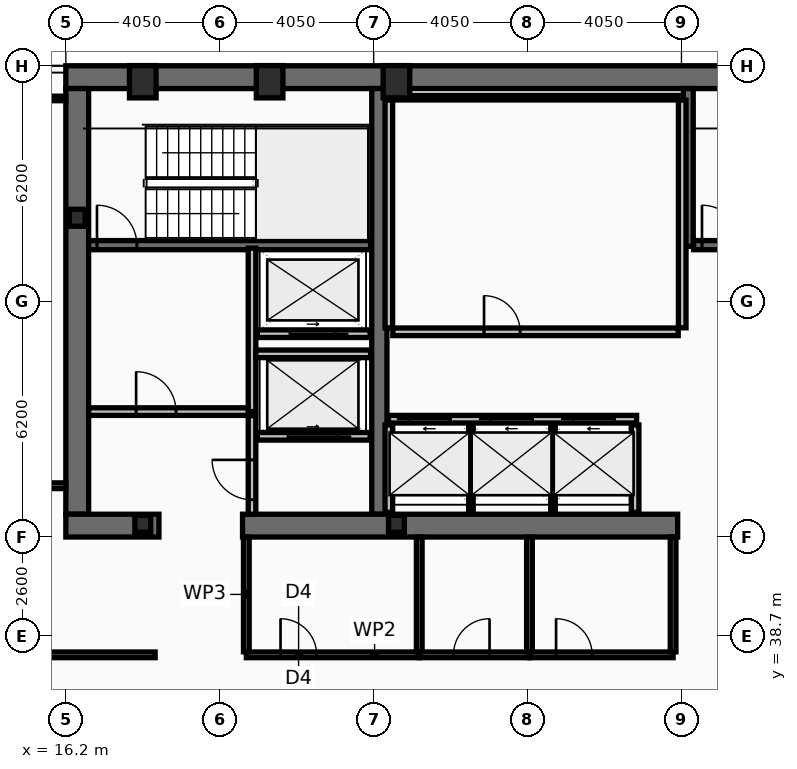
"""IFC4 building model, lengths in metres.
Left out: names, types, materials, properties, quantities, classifications, styles, units other than length and angle.
Written with IfcOpenShell. Run it as: python <this file> out.ifc"""

import sys

from ifc_helpers import new_model, si_unit, direction, frame, frame_2d, origin, origin_2d, place, context, subcontext, project, spatial, rectangle, hollow_rectangle, i_section, extrude, element, fill, save


model = new_model("IFC4")
c1 = context("Model", 3, precision=1e-05, world=origin(), true_north=direction((0.0, 1.0)))
c2 = subcontext(c1, "Body", "Model", "MODEL_VIEW")
j1 = project(units=[si_unit("LENGTHUNIT", "METRE"), si_unit("PLANEANGLEUNIT", "RADIAN")], contexts=[c1])
p1 = place(None, origin())
s1 = spatial("IfcSite", under=j1, at=p1, CompositionType="ELEMENT")
p2 = place(p1, origin())
s2 = spatial("IfcBuilding", under=s1, at=p2, CompositionType="ELEMENT")
p3 = place(p2, frame((0.0, 0.0, 177.0)))
s3 = spatial("IfcBuildingStorey", under=s2, at=p3, CompositionType="ELEMENT", Elevation=177.0)
p4 = place(p3, frame((16.2, 53.4, 0.0), z_axis=(0.0, 0.0, 1.0), x_axis=(1.0, 0.0, 0.0)))
e1 = element("IfcWall", 1, at=p4, inside=s3, PredefinedType="SHEAR", context=c2, shape_type="SweptSolid", body=[
    extrude(rectangle(XDim=40.5, YDim=0.6, at=frame_2d((20.25, 0.0))), origin(), (0.0, 0.0, 1.0), 3.44),
])
p5 = place(p3, frame((16.5, 41.9, 0.0), z_axis=(0.0, 0.0, 1.0), x_axis=(0.0, 1.0, 0.0)))
e2 = element("IfcWall", 2, at=p5, inside=s3, PredefinedType="SHEAR", context=c2, shape_type="SweptSolid", body=[
    extrude(rectangle(XDim=11.2, YDim=0.6, at=frame_2d((5.6, 0.0))), origin(), (0.0, 0.0, 1.0), 3.44),
])
p6 = place(p3, frame((24.45, 41.9, 0.0), z_axis=(0.0, 0.0, 1.0), x_axis=(0.0, 1.0, 0.0)))
e3 = element("IfcWall", 3, at=p6, inside=s3, PredefinedType="SHEAR", context=c2, shape_type="SweptSolid", body=[
    extrude(rectangle(XDim=11.2, YDim=0.4, at=frame_2d((5.6, 0.0))), origin(), (0.0, 0.0, 1.0), 3.44),
])
p7 = place(p3, frame((18.65, 41.6, 0.0), z_axis=(0.0, 0.0, 1.0), x_axis=(-1.0, 0.0, 0.0)))
e4 = element("IfcWall", 4, at=p7, inside=s3, PredefinedType="SHEAR", context=c2, shape_type="SweptSolid", body=[
    extrude(rectangle(XDim=2.45, YDim=0.6, at=frame_2d((1.225, 0.0))), origin(), (0.0, 0.0, 1.0), 3.44),
])
p8 = place(p3, frame((32.3, 41.6, 0.0), z_axis=(0.0, 0.0, 1.0), x_axis=(-1.0, 0.0, 0.0)))
e5 = element("IfcWall", 5, at=p8, inside=s3, PredefinedType="SHEAR", context=c2, shape_type="SweptSolid", body=[
    extrude(rectangle(XDim=11.45, YDim=0.6, at=frame_2d((5.725, 0.0))), origin(), (0.0, 0.0, 1.0), 3.44),
])
p9 = place(p3, frame((32.58, 48.95, 0.0), z_axis=(0.0, 0.0, 1.0), x_axis=(0.0, 1.0, 0.0)))
e6 = element("IfcWall", 6, at=p9, inside=s3, PredefinedType="SHEAR", context=c2, shape_type="SweptSolid", body=[
    extrude(rectangle(XDim=4.15, YDim=0.26, at=frame_2d((2.075, 0.0))), origin(), (0.0, 0.0, 1.0), 3.44),
])
p10 = place(p3, frame((16.8, 48.98, 0.0), z_axis=(0.0, 0.0, 1.0), x_axis=(1.0, 0.0, 0.0)))
e7 = element("IfcWall", 7, at=p10, inside=s3, PredefinedType="SHEAR", context=c2, shape_type="SweptSolid", body=[
    extrude(rectangle(XDim=7.42, YDim=0.24, at=frame_2d((3.71, 0.0))), origin(), (0.0, 0.0, 1.0), 3.44),
])
p11 = place(p10, frame((0.22, 0.0, 0.0)))
e8 = element("IfcOpeningElement", 8, at=p11, cuts=e7, PredefinedType="OPENING", context=c2, shape_type="SweptSolid", body=[
    extrude(rectangle(XDim=1.05, YDim=2.15, at=frame_2d((0.525, 1.075))), frame((0.0, 0.13, 0.0), z_axis=(0.0, -1.0, 0.0), x_axis=(1.0, 0.0, 0.0)), (0.0, 0.0, 1.0), 0.26),
])
p12 = place(p3, frame((32.72, 48.98, 0.0), z_axis=(0.0, 0.0, 1.0), x_axis=(1.0, 0.0, 0.0)))
e9 = element("IfcWall", 9, at=p12, inside=s3, PredefinedType="SHEAR", context=c2, shape_type="SweptSolid", body=[
    extrude(rectangle(XDim=7.56, YDim=0.24, at=frame_2d((3.78, 0.0))), origin(), (0.0, 0.0, 1.0), 3.44),
])
p13 = place(p12, frame((0.22, 0.0, 0.0)))
e10 = element("IfcOpeningElement", 10, at=p13, cuts=e9, PredefinedType="OPENING", context=c2, shape_type="SweptSolid", body=[
    extrude(rectangle(XDim=1.05, YDim=2.15, at=frame_2d((0.525, 1.075))), frame((0.0, 0.13, 0.0), z_axis=(0.0, -1.0, 0.0), x_axis=(1.0, 0.0, 0.0)), (0.0, 0.0, 1.0), 0.26),
])
for number, where, z_axis, x_axis in (
    (11, (18.225, 53.28, 0.0), (0.0, 0.0, 1.0), (1.0, 0.0, 0.0)),
    (12, (21.562, 53.28, 0.0), (0.0, 0.0, 1.0), (1.0, 0.0, 0.0)),
    (13, (24.9, 53.28, 0.0), (0.0, 0.0, 1.0), (1.0, 0.0, 0.0)),
):
    element("IfcColumn", number, at=place(p3, frame(where, z_axis=z_axis, x_axis=x_axis)), inside=s3, PredefinedType="COLUMN", context=c2, shape_type="SweptSolid", body=[
        extrude(hollow_rectangle(XDim=0.7, YDim=0.85, WallThickness=0.05, at=origin_2d()), origin(), (0.0, 0.0, 1.0), 3.6),
    ])
for number, where, z_axis, x_axis in (
    (14, (16.5, 49.7, 0.0), (0.0, 0.0, 1.0), (1.0, 0.0, 0.0)),
    (15, (18.225, 41.65, 0.0), (0.0, 0.0, 1.0), (1.0, 0.0, 0.0)),
    (16, (24.9, 41.65, 0.0), (0.0, 0.0, 1.0), (1.0, 0.0, 0.0)),
):
    element("IfcColumn", number, at=place(p3, frame(where, z_axis=z_axis, x_axis=x_axis)), inside=s3, PredefinedType="COLUMN", context=c2, shape_type="SweptSolid", body=[
        extrude(i_section(OverallWidth=0.416, OverallDepth=0.446, WebThickness=0.039, FlangeThickness=0.063, at=origin_2d()), origin(), (0.0, 0.0, 1.0), 3.6),
    ])
p14 = place(p3, frame((24.69, 44.4, 0.0), z_axis=(0.0, 0.0, 1.0), x_axis=(1.0, 0.0, 0.0)))
e17 = element("IfcWall", 17, at=p14, inside=s3, PredefinedType="PARTITIONING", context=c2, shape_type="SweptSolid", body=[
    extrude(rectangle(XDim=6.53, YDim=0.2, at=frame_2d((3.265, 0.0))), origin(), (0.0, 0.0, 1.0), 3.44),
])
p15 = place(p14, frame((0.53, 0.0, 0.0)))
e18 = element("IfcOpeningElement", 18, at=p15, cuts=e17, PredefinedType="OPENING", context=c2, shape_type="SweptSolid", body=[
    extrude(rectangle(XDim=1.1, YDim=2.18, at=frame_2d((0.55, 1.09))), frame((0.0, 0.11, 0.0), z_axis=(0.0, -1.0, 0.0), x_axis=(1.0, 0.0, 0.0)), (0.0, 0.0, 1.0), 0.22),
])
p16 = place(p14, frame((2.69, 0.0, 0.0)))
e19 = element("IfcOpeningElement", 19, at=p16, cuts=e17, PredefinedType="OPENING", context=c2, shape_type="SweptSolid", body=[
    extrude(rectangle(XDim=1.1, YDim=2.18, at=frame_2d((0.55, 1.09))), frame((0.0, 0.11, 0.0), z_axis=(0.0, -1.0, 0.0), x_axis=(1.0, 0.0, 0.0)), (0.0, 0.0, 1.0), 0.22),
])
p17 = place(p14, frame((4.85, 0.0, 0.0)))
e20 = element("IfcOpeningElement", 20, at=p17, cuts=e17, PredefinedType="OPENING", context=c2, shape_type="SweptSolid", body=[
    extrude(rectangle(XDim=1.1, YDim=2.18, at=frame_2d((0.55, 1.09))), frame((0.0, 0.11, 0.0), z_axis=(0.0, -1.0, 0.0), x_axis=(1.0, 0.0, 0.0)), (0.0, 0.0, 1.0), 0.22),
])
p18 = place(p3, frame((24.21, 43.95, 0.0), z_axis=(0.0, 0.0, 1.0), x_axis=(-1.0, 0.0, 0.0)))
e21 = element("IfcWall", 21, at=p18, inside=s3, PredefinedType="PARTITIONING", context=c2, shape_type="SweptSolid", body=[
    extrude(rectangle(XDim=2.97, YDim=0.2, at=frame_2d((1.485, 0.0))), origin(), (0.0, 0.0, 1.0), 3.44),
])
p19 = place(p18, frame((0.86, 0.0, 0.0)))
e22 = element("IfcOpeningElement", 22, at=p19, cuts=e21, PredefinedType="OPENING", context=c2, shape_type="SweptSolid", body=[
    extrude(rectangle(XDim=1.3, YDim=2.18, at=frame_2d((0.65, 1.09))), frame((0.0, 0.11, 0.0), z_axis=(0.0, -1.0, 0.0), x_axis=(1.0, 0.0, 0.0)), (0.0, 0.0, 1.0), 0.22),
])
p20 = place(p3, frame((24.21, 46.65, 0.0), z_axis=(0.0, 0.0, 1.0), x_axis=(-1.0, 0.0, 0.0)))
e23 = element("IfcWall", 23, at=p20, inside=s3, PredefinedType="PARTITIONING", context=c2, shape_type="SweptSolid", body=[
    extrude(rectangle(XDim=2.97, YDim=0.2, at=frame_2d((1.485, 0.0))), origin(), (0.0, 0.0, 1.0), 3.44),
])
p21 = place(p20, frame((0.91, 0.0, 0.0)))
e24 = element("IfcOpeningElement", 24, at=p21, cuts=e23, PredefinedType="OPENING", context=c2, shape_type="SweptSolid", body=[
    extrude(rectangle(XDim=1.2, YDim=2.18, at=frame_2d((0.6, 1.09))), frame((0.0, 0.11, 0.0), z_axis=(0.0, -1.0, 0.0), x_axis=(1.0, 0.0, 0.0)), (0.0, 0.0, 1.0), 0.22),
])
p22 = place(p3, frame((21.1, 44.6, 0.0), z_axis=(0.0, 0.0, 1.0), x_axis=(0.0, 1.0, 0.0)))
e25 = element("IfcWall", 25, at=p22, inside=s3, PredefinedType="PARTITIONING", context=c2, shape_type="SweptSolid", body=[
    extrude(rectangle(XDim=4.3, YDim=0.2, at=frame_2d((2.15, 0.0))), origin(), (0.0, 0.0, 1.0), 3.44),
])
p23 = place(p3, frame((16.8, 44.6, 0.0), z_axis=(0.0, 0.0, 1.0), x_axis=(1.0, 0.0, 0.0)))
e26 = element("IfcWall", 26, at=p23, inside=s3, PredefinedType="PARTITIONING", context=c2, shape_type="SweptSolid", body=[
    extrude(rectangle(XDim=4.2, YDim=0.2, at=frame_2d((2.1, 0.0))), origin(), (0.0, 0.0, 1.0), 3.44),
])
p24 = place(p23, frame((1.25, 0.0, 0.0)))
e27 = element("IfcOpeningElement", 27, at=p24, cuts=e26, PredefinedType="OPENING", context=c2, shape_type="SweptSolid", body=[
    extrude(rectangle(XDim=1.05, YDim=2.15, at=frame_2d((0.525, 1.075))), frame((0.0, 0.11, 0.0), z_axis=(0.0, -1.0, 0.0), x_axis=(1.0, 0.0, 0.0)), (0.0, 0.0, 1.0), 0.22),
])
p25 = place(p3, frame((21.2, 46.12, 0.0), z_axis=(0.0, 0.0, 1.0), x_axis=(1.0, 0.0, 0.0)))
e28 = element("IfcWall", 28, at=p25, inside=s3, PredefinedType="PARTITIONING", context=c2, shape_type="SweptSolid", body=[
    extrude(rectangle(XDim=3.02, YDim=0.2, at=frame_2d((1.51, 0.0))), origin(), (0.0, 0.0, 1.0), 3.44),
])
p26 = place(p3, frame((21.1, 41.9, 0.0), z_axis=(0.0, 0.0, 1.0), x_axis=(0.0, 1.0, 0.0)))
e29 = element("IfcWall", 29, at=p26, inside=s3, PredefinedType="PARTITIONING", context=c2, shape_type="SweptSolid", body=[
    extrude(rectangle(XDim=2.595, YDim=0.2, at=frame_2d((1.298, 0.0))), origin(), (0.0, 0.0, 1.0), 3.44),
])
p27 = place(p26, frame((0.38, 0.0, 0.0)))
e30 = element("IfcOpeningElement", 30, at=p27, cuts=e29, PredefinedType="OPENING", context=c2, shape_type="SweptSolid", body=[
    extrude(rectangle(XDim=1.05, YDim=2.15, at=frame_2d((0.525, 1.075))), frame((0.0, 0.11, 0.0), z_axis=(0.0, -1.0, 0.0), x_axis=(1.0, 0.0, 0.0)), (0.0, 0.0, 1.0), 0.22),
])
for number, where, z_axis, x_axis in (
    (31, (24.7, 46.805, 0.0), (0.0, 0.0, 1.0), (0.0, 1.0, 0.0)),
    (32, (32.42, 46.805, 0.0), (0.0, 0.0, 1.0), (0.0, 1.0, 0.0)),
):
    element("IfcWall", number, at=place(p3, frame(where, z_axis=z_axis, x_axis=x_axis)), inside=s3, PredefinedType="PARTITIONING", context=c2, shape_type="SweptSolid", body=[
        extrude(rectangle(XDim=5.99, YDim=0.2, at=frame_2d((2.995, 0.0))), origin(), (0.0, 0.0, 1.0), 3.44),
    ])
p28 = place(p3, frame((24.805, 52.86, 0.0), z_axis=(0.0, 0.0, 1.0), x_axis=(1.0, 0.0, 0.0)))
e33 = element("IfcWall", 33, at=p28, inside=s3, PredefinedType="PARTITIONING", context=c2, shape_type="SweptSolid", body=[
    extrude(rectangle(XDim=7.51, YDim=0.12, at=frame_2d((3.755, 0.0))), origin(), (0.0, 0.0, 1.0), 3.44),
])
p29 = place(p3, frame((24.805, 46.7, 0.0), z_axis=(0.0, 0.0, 1.0), x_axis=(1.0, 0.0, 0.0)))
e34 = element("IfcWall", 34, at=p29, inside=s3, PredefinedType="PARTITIONING", context=c2, shape_type="SweptSolid", body=[
    extrude(rectangle(XDim=7.51, YDim=0.2, at=frame_2d((3.755, 0.0))), origin(), (0.0, 0.0, 1.0), 3.44),
])
p30 = place(p29, frame((2.4, 0.0, 0.0)))
e35 = element("IfcOpeningElement", 35, at=p30, cuts=e34, PredefinedType="OPENING", context=c2, shape_type="SweptSolid", body=[
    extrude(rectangle(XDim=0.95, YDim=2.1, at=frame_2d((0.475, 1.05))), frame((0.0, 0.11, 0.0), z_axis=(0.0, -1.0, 0.0), x_axis=(1.0, 0.0, 0.0)), (0.0, 0.0, 1.0), 0.22),
])
for number, where, z_axis, x_axis in (
    (36, (24.7, 41.95, 0.0), (0.0, 0.0, 1.0), (0.0, 1.0, 0.0)),
    (37, (31.18, 41.95, 0.0), (0.0, 0.0, 1.0), (0.0, 1.0, 0.0)),
):
    element("IfcWall", number, at=place(p3, frame(where, z_axis=z_axis, x_axis=x_axis)), inside=s3, PredefinedType="PARTITIONING", context=c2, shape_type="SweptSolid", body=[
        extrude(rectangle(XDim=2.3, YDim=0.2, at=frame_2d((1.15, 0.0))), origin(), (0.0, 0.0, 1.0), 3.44),
    ])
for number, where, z_axis, x_axis in (
    (38, (26.86, 41.95, 0.0), (0.0, 0.0, 1.0), (0.0, 1.0, 0.0)),
    (39, (29.02, 41.95, 0.0), (0.0, 0.0, 1.0), (0.0, 1.0, 0.0)),
):
    element("IfcWall", number, at=place(p3, frame(where, z_axis=z_axis, x_axis=x_axis)), inside=s3, PredefinedType="PARTITIONING", context=c2, shape_type="SweptSolid", body=[
        extrude(rectangle(XDim=2.3, YDim=0.12, at=frame_2d((1.15, 0.0))), origin(), (0.0, 0.0, 1.0), 3.44),
    ])
p31 = place(p3, frame((20.95, 38.2, 0.0), z_axis=(0.0, 0.0, 1.0), x_axis=(1.0, 0.0, 0.0)))
e40 = element("IfcWall", 40, at=p31, inside=s3, PredefinedType="PARTITIONING", context=c2, shape_type="SweptSolid", body=[
    extrude(rectangle(XDim=4.55, YDim=0.15, at=frame_2d((2.275, 0.0))), origin(), (0.0, 0.0, 1.0), 2.73),
])
p32 = place(p31, frame((0.9, 0.0, 0.0)))
e41 = element("IfcOpeningElement", 41, at=p32, cuts=e40, PredefinedType="OPENING", context=c2, shape_type="SweptSolid", body=[
    extrude(rectangle(XDim=0.95, YDim=2.05, at=frame_2d((0.475, 1.025))), frame((0.0, 0.085, 0.0), z_axis=(0.0, -1.0, 0.0), x_axis=(1.0, 0.0, 0.0)), (0.0, 0.0, 1.0), 0.17),
])
p33 = place(p3, frame((25.5, 38.2, 0.0), z_axis=(0.0, 0.0, 1.0), x_axis=(1.0, 0.0, 0.0)))
e42 = element("IfcWall", 42, at=p33, inside=s3, PredefinedType="PARTITIONING", context=c2, shape_type="SweptSolid", body=[
    extrude(rectangle(XDim=2.9, YDim=0.15, at=frame_2d((1.45, 0.0))), origin(), (0.0, 0.0, 1.0), 3.44),
])
p34 = place(p33, frame((0.9, 0.0, 0.0)))
e43 = element("IfcOpeningElement", 43, at=p34, cuts=e42, PredefinedType="OPENING", context=c2, shape_type="SweptSolid", body=[
    extrude(rectangle(XDim=0.95, YDim=2.05, at=frame_2d((0.475, 1.025))), frame((0.0, 0.085, 0.0), z_axis=(0.0, -1.0, 0.0), x_axis=(1.0, 0.0, 0.0)), (0.0, 0.0, 1.0), 0.17),
])
p35 = place(p3, frame((28.4, 38.2, 0.0), z_axis=(0.0, 0.0, 1.0), x_axis=(1.0, 0.0, 0.0)))
e44 = element("IfcWall", 44, at=p35, inside=s3, PredefinedType="PARTITIONING", context=c2, shape_type="SweptSolid", body=[
    extrude(rectangle(XDim=3.78, YDim=0.15, at=frame_2d((1.89, 0.0))), origin(), (0.0, 0.0, 1.0), 2.73),
])
p36 = place(p35, frame((0.7, 0.0, 0.0)))
e45 = element("IfcOpeningElement", 45, at=p36, cuts=e44, PredefinedType="OPENING", context=c2, shape_type="SweptSolid", body=[
    extrude(rectangle(XDim=0.95, YDim=2.05, at=frame_2d((0.475, 1.025))), frame((0.0, 0.085, 0.0), z_axis=(0.0, -1.0, 0.0), x_axis=(1.0, 0.0, 0.0)), (0.0, 0.0, 1.0), 0.17),
])
for number, where, z_axis, x_axis in (
    (46, (20.95, 38.28, 0.0), (0.0, 0.0, 1.0), (0.0, 1.0, 0.0)),
    (47, (25.5, 38.28, 0.0), (0.0, 0.0, 1.0), (0.0, 1.0, 0.0)),
    (48, (28.4, 38.28, 0.0), (0.0, 0.0, 1.0), (0.0, 1.0, 0.0)),
    (49, (32.18, 38.28, 0.0), (0.0, 0.0, 1.0), (0.0, 1.0, 0.0)),
):
    element("IfcWall", number, at=place(p3, frame(where, z_axis=z_axis, x_axis=x_axis)), inside=s3, PredefinedType="PARTITIONING", context=c2, shape_type="SweptSolid", body=[
        extrude(rectangle(XDim=3.02, YDim=0.15, at=frame_2d((1.51, 0.0))), origin(), (0.0, 0.0, 1.0), 3.44),
    ])
p37 = place(p3, frame((6.03, 38.2, 0.0), z_axis=(0.0, 0.0, 1.0), x_axis=(1.0, 0.0, 0.0)))
e50 = element("IfcWall", 50, at=p37, inside=s3, PredefinedType="PARTITIONING", context=c2, shape_type="SweptSolid", body=[
    extrude(rectangle(XDim=12.52, YDim=0.15, at=frame_2d((6.26, 0.0))), origin(), (0.0, 0.0, 1.0), 2.73),
])
p38 = place(p37, frame((8.32, 0.0, 0.0)))
e51 = element("IfcOpeningElement", 51, at=p38, cuts=e50, PredefinedType="OPENING", context=c2, shape_type="SweptSolid", body=[
    extrude(rectangle(XDim=0.95, YDim=2.05, at=frame_2d((0.475, 1.025))), frame((0.0, 0.085, 0.0), z_axis=(0.0, -1.0, 0.0), x_axis=(1.0, 0.0, 0.0)), (0.0, 0.0, 1.0), 0.17),
])
p39 = place(p3, frame((6.095, 42.65, 0.0), z_axis=(0.0, 0.0, 1.0), x_axis=(1.0, 0.0, 0.0)))
e52 = element("IfcWall", 52, at=p39, inside=s3, PredefinedType="PARTITIONING", context=c2, shape_type="SweptSolid", body=[
    extrude(rectangle(XDim=10.105, YDim=0.15, at=frame_2d((5.052, 0.0))), origin(), (0.0, 0.0, 1.0), 2.73),
])
p40 = place(p39, frame((8.32, 0.0, 0.0)))
e53 = element("IfcOpeningElement", 53, at=p40, cuts=e52, PredefinedType="OPENING", context=c2, shape_type="SweptSolid", body=[
    extrude(rectangle(XDim=0.9, YDim=2.05, at=frame_2d((0.45, 1.025))), frame((0.0, 0.085, 0.0), z_axis=(0.0, -1.0, 0.0), x_axis=(1.0, 0.0, 0.0)), (0.0, 0.0, 1.0), 0.17),
])
p41 = place(p3, frame((6.095, 52.84, 0.0), z_axis=(0.0, 0.0, 1.0), x_axis=(1.0, 0.0, 0.0)))
e54 = element("IfcWall", 54, at=p41, inside=s3, PredefinedType="PARTITIONING", context=c2, shape_type="SweptSolid", body=[
    extrude(rectangle(XDim=10.105, YDim=0.12, at=frame_2d((5.052, 0.0))), origin(), (0.0, 0.0, 1.0), 3.44),
])
p42 = place(p11, origin())
e55 = element("IfcDoor", 55, at=p42, inside=s3, OperationType="SINGLE_SWING_LEFT", PredefinedType="DOOR", context=c2, shape_type="SweptSolid", body=[
    extrude(rectangle(XDim=1.05, YDim=2.15, at=frame_2d((0.525, 1.075))), frame((0.0, 0.025, 0.0), z_axis=(0.0, -1.0, 0.0), x_axis=(1.0, 0.0, 0.0)), (0.0, 0.0, 1.0), 0.05),
])
fill(e8, e55)
p43 = place(p13, origin())
e56 = element("IfcDoor", 56, at=p43, inside=s3, OperationType="SINGLE_SWING_LEFT", PredefinedType="DOOR", context=c2, shape_type="SweptSolid", body=[
    extrude(rectangle(XDim=1.05, YDim=2.15, at=frame_2d((0.525, 1.075))), frame((0.0, 0.025, 0.0), z_axis=(0.0, -1.0, 0.0), x_axis=(1.0, 0.0, 0.0)), (0.0, 0.0, 1.0), 0.05),
])
fill(e10, e56)
p44 = place(p15, origin())
e57 = element("IfcDoor", 57, at=p44, inside=s3, OperationType="SLIDING_TO_LEFT", PredefinedType="DOOR", context=c2, shape_type="SweptSolid", body=[
    extrude(rectangle(XDim=1.1, YDim=2.18, at=frame_2d((0.55, 1.09))), frame((0.0, 0.025, 0.0), z_axis=(0.0, -1.0, 0.0), x_axis=(1.0, 0.0, 0.0)), (0.0, 0.0, 1.0), 0.05),
])
fill(e18, e57)
p45 = place(p16, origin())
e58 = element("IfcDoor", 58, at=p45, inside=s3, OperationType="SLIDING_TO_LEFT", PredefinedType="DOOR", context=c2, shape_type="SweptSolid", body=[
    extrude(rectangle(XDim=1.1, YDim=2.18, at=frame_2d((0.55, 1.09))), frame((0.0, 0.025, 0.0), z_axis=(0.0, -1.0, 0.0), x_axis=(1.0, 0.0, 0.0)), (0.0, 0.0, 1.0), 0.05),
])
fill(e19, e58)
p46 = place(p17, origin())
e59 = element("IfcDoor", 59, at=p46, inside=s3, OperationType="SLIDING_TO_LEFT", PredefinedType="DOOR", context=c2, shape_type="SweptSolid", body=[
    extrude(rectangle(XDim=1.1, YDim=2.18, at=frame_2d((0.55, 1.09))), frame((0.0, 0.025, 0.0), z_axis=(0.0, -1.0, 0.0), x_axis=(1.0, 0.0, 0.0)), (0.0, 0.0, 1.0), 0.05),
])
fill(e20, e59)
p47 = place(p19, origin())
e60 = element("IfcDoor", 60, at=p47, inside=s3, OperationType="SLIDING_TO_LEFT", PredefinedType="DOOR", context=c2, shape_type="SweptSolid", body=[
    extrude(rectangle(XDim=1.3, YDim=2.18, at=frame_2d((0.65, 1.09))), frame((0.0, 0.025, 0.0), z_axis=(0.0, -1.0, 0.0), x_axis=(1.0, 0.0, 0.0)), (0.0, 0.0, 1.0), 0.05),
])
fill(e22, e60)
p48 = place(p21, origin())
e61 = element("IfcDoor", 61, at=p48, inside=s3, OperationType="SLIDING_TO_LEFT", PredefinedType="DOOR", context=c2, shape_type="SweptSolid", body=[
    extrude(rectangle(XDim=1.2, YDim=2.18, at=frame_2d((0.6, 1.09))), frame((0.0, 0.025, 0.0), z_axis=(0.0, -1.0, 0.0), x_axis=(1.0, 0.0, 0.0)), (0.0, 0.0, 1.0), 0.05),
])
fill(e24, e61)
p49 = place(p24, origin())
e62 = element("IfcDoor", 62, at=p49, inside=s3, OperationType="SINGLE_SWING_LEFT", PredefinedType="DOOR", context=c2, shape_type="SweptSolid", body=[
    extrude(rectangle(XDim=1.05, YDim=2.15, at=frame_2d((0.525, 1.075))), frame((0.0, 0.025, 0.0), z_axis=(0.0, -1.0, 0.0), x_axis=(1.0, 0.0, 0.0)), (0.0, 0.0, 1.0), 0.05),
])
fill(e27, e62)
p50 = place(p27, origin())
e63 = element("IfcDoor", 63, at=p50, inside=s3, OperationType="SINGLE_SWING_RIGHT", PredefinedType="DOOR", context=c2, shape_type="SweptSolid", body=[
    extrude(rectangle(XDim=1.05, YDim=2.15, at=frame_2d((0.525, 1.075))), frame((0.0, 0.025, 0.0), z_axis=(0.0, -1.0, 0.0), x_axis=(1.0, 0.0, 0.0)), (0.0, 0.0, 1.0), 0.05),
])
fill(e30, e63)
p51 = place(p30, origin())
e64 = element("IfcDoor", 64, at=p51, inside=s3, OperationType="SINGLE_SWING_LEFT", PredefinedType="DOOR", context=c2, shape_type="SweptSolid", body=[
    extrude(rectangle(XDim=0.95, YDim=2.1, at=frame_2d((0.475, 1.05))), frame((0.0, 0.025, 0.0), z_axis=(0.0, -1.0, 0.0), x_axis=(1.0, 0.0, 0.0)), (0.0, 0.0, 1.0), 0.05),
])
fill(e35, e64)
p52 = place(p32, origin())
e65 = element("IfcDoor", 65, at=p52, inside=s3, OperationType="SINGLE_SWING_LEFT", PredefinedType="DOOR", context=c2, shape_type="SweptSolid", body=[
    extrude(rectangle(XDim=0.95, YDim=2.05, at=frame_2d((0.475, 1.025))), frame((0.0, 0.025, 0.0), z_axis=(0.0, -1.0, 0.0), x_axis=(1.0, 0.0, 0.0)), (0.0, 0.0, 1.0), 0.05),
])
fill(e41, e65)
p53 = place(p34, origin())
e66 = element("IfcDoor", 66, at=p53, inside=s3, OperationType="SINGLE_SWING_RIGHT", PredefinedType="DOOR", context=c2, shape_type="SweptSolid", body=[
    extrude(rectangle(XDim=0.95, YDim=2.05, at=frame_2d((0.475, 1.025))), frame((0.0, 0.025, 0.0), z_axis=(0.0, -1.0, 0.0), x_axis=(1.0, 0.0, 0.0)), (0.0, 0.0, 1.0), 0.05),
])
fill(e43, e66)
p54 = place(p36, origin())
e67 = element("IfcDoor", 67, at=p54, inside=s3, OperationType="SINGLE_SWING_LEFT", PredefinedType="DOOR", context=c2, shape_type="SweptSolid", body=[
    extrude(rectangle(XDim=0.95, YDim=2.05, at=frame_2d((0.475, 1.025))), frame((0.0, 0.025, 0.0), z_axis=(0.0, -1.0, 0.0), x_axis=(1.0, 0.0, 0.0)), (0.0, 0.0, 1.0), 0.05),
])
fill(e45, e67)
save(model, sys.argv[1])
